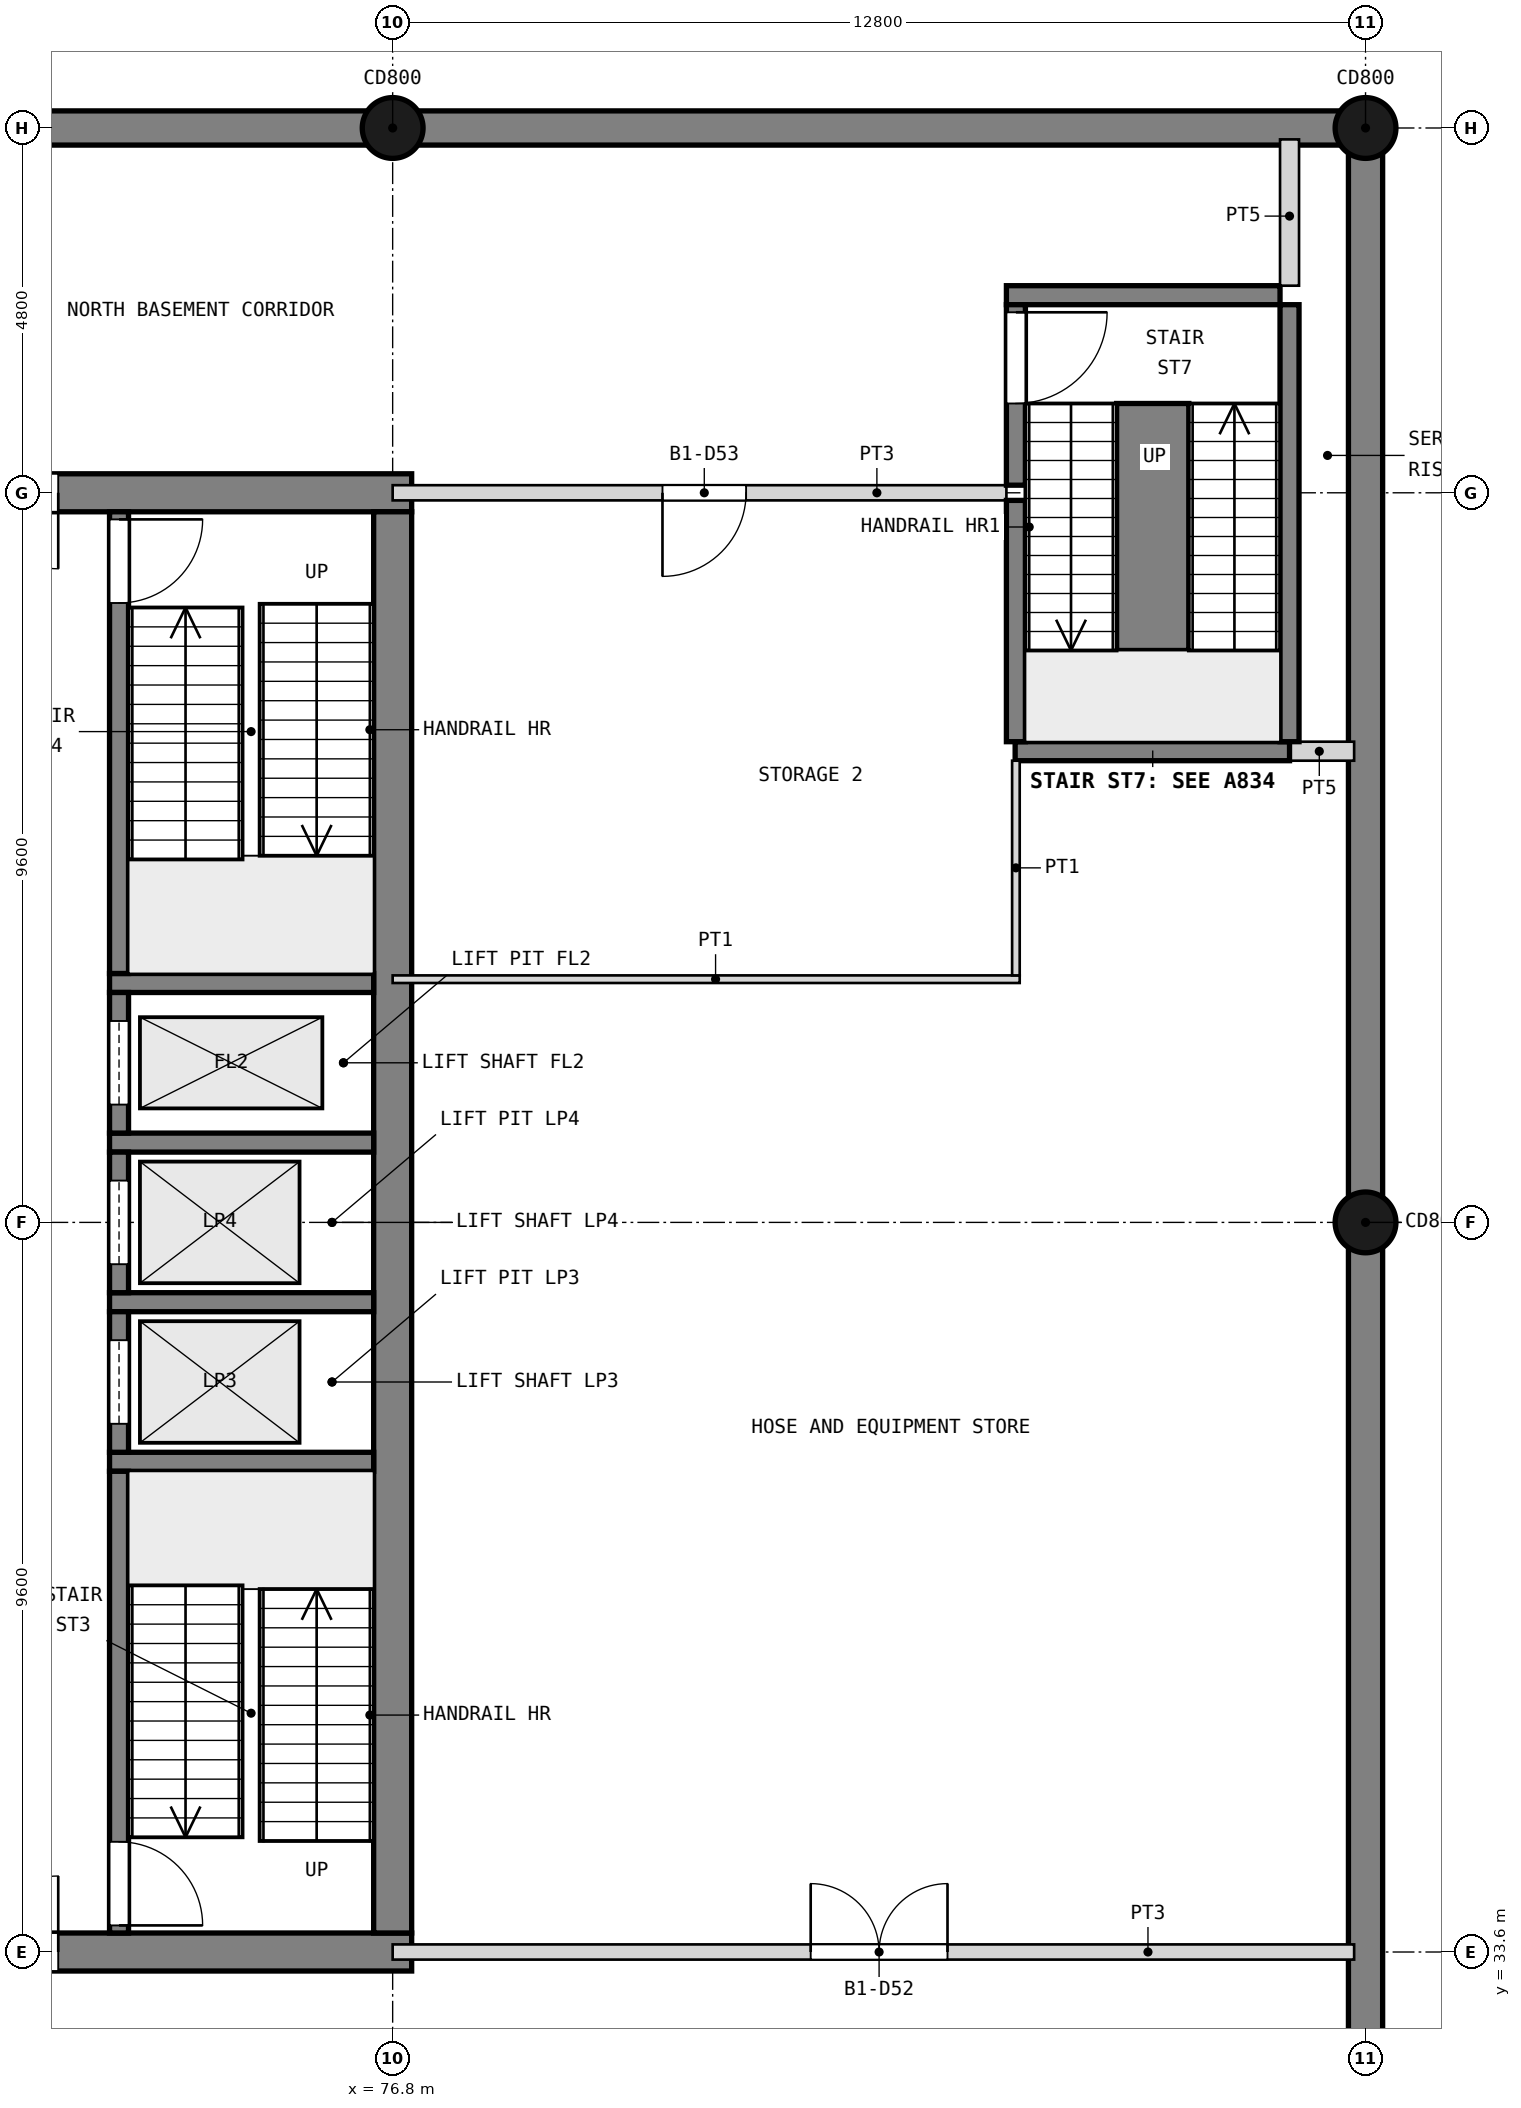
"""IFC4 building model, lengths in metres.
Left out: names, types, materials, properties, quantities, classifications, styles, units other than length and angle.
Written with IfcOpenShell. Run it as: python <this file> out.ifc"""

import sys

from ifc_helpers import new_model, si_unit, direction, frame, frame_2d, origin, origin_2d, place, context, subcontext, project, spatial, rectangle, circle, extrude, element, fill, save


model = new_model("IFC4")
c1 = context("Model", 3, precision=1e-05, world=origin(), true_north=direction((0.0, 1.0)))
c2 = subcontext(c1, "Body", "Model", "MODEL_VIEW")
j1 = project(units=[si_unit("LENGTHUNIT", "METRE"), si_unit("PLANEANGLEUNIT", "RADIAN")], contexts=[c1])
p1 = place(None, origin())
s1 = spatial("IfcSite", under=j1, at=p1, CompositionType="ELEMENT")
p2 = place(p1, origin())
s2 = spatial("IfcBuilding", under=s1, at=p2, CompositionType="ELEMENT")
p3 = place(p2, frame((0.0, 0.0, -4.8)))
s3 = spatial("IfcBuildingStorey", under=s2, at=p3, CompositionType="ELEMENT", Elevation=-4.8)
p4 = place(p3, frame((63.75, 52.8, 0.0), z_axis=(0.0, 0.0, 1.0), x_axis=(1.0, 0.0, 0.0)))
e1 = element("IfcWall", 1, at=p4, inside=s3, PredefinedType="SHEAR", context=c2, shape_type="SweptSolid", body=[
    extrude(rectangle(XDim=13.3, YDim=0.5, at=frame_2d((6.65, 0.0))), origin(), (0.0, 0.0, 1.0), 4.8),
])
p5 = place(p4, frame((6.65, 0.0, 0.0)))
e2 = element("IfcOpeningElement", 2, at=p5, cuts=e1, PredefinedType="OPENING", context=c2, shape_type="SweptSolid", body=[
    extrude(rectangle(XDim=2.0, YDim=2.1, at=frame_2d((1.0, 1.05))), frame((0.0, 0.26, 0.0), z_axis=(0.0, -1.0, 0.0), x_axis=(1.0, 0.0, 0.0)), (0.0, 0.0, 1.0), 0.52),
])
p6 = place(p3, frame((63.75, 33.6, 0.0), z_axis=(0.0, 0.0, 1.0), x_axis=(1.0, 0.0, 0.0)))
e3 = element("IfcWall", 3, at=p6, inside=s3, PredefinedType="SHEAR", context=c2, shape_type="SweptSolid", body=[
    extrude(rectangle(XDim=13.3, YDim=0.5, at=frame_2d((6.65, 0.0))), origin(), (0.0, 0.0, 1.0), 4.8),
])
p7 = place(p6, frame((6.65, 0.0, 0.0)))
e4 = element("IfcOpeningElement", 4, at=p7, cuts=e3, PredefinedType="OPENING", context=c2, shape_type="SweptSolid", body=[
    extrude(rectangle(XDim=2.0, YDim=2.1, at=frame_2d((1.0, 1.05))), frame((0.0, 0.26, 0.0), z_axis=(0.0, -1.0, 0.0), x_axis=(1.0, 0.0, 0.0)), (0.0, 0.0, 1.0), 0.52),
])
p8 = place(p3, frame((76.8, 33.85, 0.0), z_axis=(0.0, 0.0, 1.0), x_axis=(0.0, 1.0, 0.0)))
e5 = element("IfcWall", 5, at=p8, inside=s3, PredefinedType="SHEAR", context=c2, shape_type="SweptSolid", body=[
    extrude(rectangle(XDim=18.7, YDim=0.5, at=frame_2d((9.35, 0.0))), origin(), (0.0, 0.0, 1.0), 4.8),
])
p9 = place(p3, frame((89.6, -0.225, 0.0), z_axis=(0.0, 0.0, 1.0), x_axis=(0.0, 1.0, 0.0)))
e6 = element("IfcWall", 6, at=p9, inside=s3, PredefinedType="SOLIDWALL", context=c2, shape_type="SweptSolid", body=[
    extrude(rectangle(XDim=58.05, YDim=0.45, at=frame_2d((29.025, 0.0))), origin(), (0.0, 0.0, 1.0), 4.8),
])
p10 = place(p3, frame((89.375, 57.6, 0.0), z_axis=(0.0, 0.0, 1.0), x_axis=(-1.0, 0.0, 0.0)))
e7 = element("IfcWall", 7, at=p10, inside=s3, PredefinedType="SOLIDWALL", context=c2, shape_type="SweptSolid", body=[
    extrude(rectangle(XDim=25.15, YDim=0.45, at=frame_2d((12.575, 0.0))), origin(), (0.0, 0.0, 1.0), 4.8),
])
for number, where, z_axis, x_axis in (
    (8, (89.6, 43.2, 0.0), (0.0, 0.0, 1.0), (1.0, 0.0, 0.0)),
    (9, (89.6, 57.6, 0.0), (0.0, 0.0, 1.0), (1.0, 0.0, 0.0)),
    (10, (76.8, 57.6, 0.0), (0.0, 0.0, 1.0), (1.0, 0.0, 0.0)),
):
    element("IfcColumn", number, at=place(p3, frame(where, z_axis=z_axis, x_axis=x_axis)), inside=s3, PredefinedType="COLUMN", context=c2, shape_type="SweptSolid", body=[
        extrude(circle(Radius=0.4, at=origin_2d()), origin(), (0.0, 0.0, 1.0), 4.8),
    ])
for number, where, z_axis, x_axis in (
    (11, (76.55, 40.05, 0.0), (0.0, 0.0, 1.0), (-1.0, 0.0, 0.0)),
    (12, (76.55, 42.15, 0.0), (0.0, 0.0, 1.0), (-1.0, 0.0, 0.0)),
    (13, (76.55, 44.25, 0.0), (0.0, 0.0, 1.0), (-1.0, 0.0, 0.0)),
    (14, (76.55, 46.35, 0.0), (0.0, 0.0, 1.0), (-1.0, 0.0, 0.0)),
):
    element("IfcWall", number, at=place(p3, frame(where, z_axis=z_axis, x_axis=x_axis)), inside=s3, PredefinedType="SOLIDWALL", context=c2, shape_type="SweptSolid", body=[
        extrude(rectangle(XDim=3.475, YDim=0.25, at=frame_2d((1.738, 0.0))), origin(), (0.0, 0.0, 1.0), 4.5),
    ])
p11 = place(p3, frame((73.2, 33.85, 0.0), z_axis=(0.0, 0.0, 1.0), x_axis=(0.0, 1.0, 0.0)))
e15 = element("IfcWall", 15, at=p11, inside=s3, PredefinedType="SOLIDWALL", context=c2, shape_type="SweptSolid", body=[
    extrude(rectangle(XDim=6.075, YDim=0.25, at=frame_2d((3.038, 0.0))), origin(), (0.0, 0.0, 1.0), 4.5),
])
p12 = place(p11, frame((0.1, 0.0, 0.0)))
e16 = element("IfcOpeningElement", 16, at=p12, cuts=e15, PredefinedType="OPENING", context=c2, shape_type="SweptSolid", body=[
    extrude(rectangle(XDim=1.1, YDim=2.1, at=frame_2d((0.55, 1.05))), frame((0.0, 0.135, 0.0), z_axis=(0.0, -1.0, 0.0), x_axis=(1.0, 0.0, 0.0)), (0.0, 0.0, 1.0), 0.27),
])
p13 = place(p3, frame((73.2, 40.175, 0.0), z_axis=(0.0, 0.0, 1.0), x_axis=(0.0, 1.0, 0.0)))
e17 = element("IfcWall", 17, at=p13, inside=s3, PredefinedType="SOLIDWALL", context=c2, shape_type="SweptSolid", body=[
    extrude(rectangle(XDim=1.85, YDim=0.25, at=frame_2d((0.925, 0.0))), origin(), (0.0, 0.0, 1.0), 4.5),
])
p14 = place(p13, frame((0.375, 0.0, 0.0)))
e18 = element("IfcOpeningElement", 18, at=p14, cuts=e17, PredefinedType="OPENING", context=c2, shape_type="SweptSolid", body=[
    extrude(rectangle(XDim=1.1, YDim=2.1, at=frame_2d((0.55, 1.05))), frame((0.0, 0.135, 0.0), z_axis=(0.0, -1.0, 0.0), x_axis=(1.0, 0.0, 0.0)), (0.0, 0.0, 1.0), 0.27),
])
p15 = place(p3, frame((73.2, 42.275, 0.0), z_axis=(0.0, 0.0, 1.0), x_axis=(0.0, 1.0, 0.0)))
e19 = element("IfcWall", 19, at=p15, inside=s3, PredefinedType="SOLIDWALL", context=c2, shape_type="SweptSolid", body=[
    extrude(rectangle(XDim=1.85, YDim=0.25, at=frame_2d((0.925, 0.0))), origin(), (0.0, 0.0, 1.0), 4.5),
])
p16 = place(p15, frame((0.375, 0.0, 0.0)))
e20 = element("IfcOpeningElement", 20, at=p16, cuts=e19, PredefinedType="OPENING", context=c2, shape_type="SweptSolid", body=[
    extrude(rectangle(XDim=1.1, YDim=2.1, at=frame_2d((0.55, 1.05))), frame((0.0, 0.135, 0.0), z_axis=(0.0, -1.0, 0.0), x_axis=(1.0, 0.0, 0.0)), (0.0, 0.0, 1.0), 0.27),
])
p17 = place(p3, frame((73.2, 44.375, 0.0), z_axis=(0.0, 0.0, 1.0), x_axis=(0.0, 1.0, 0.0)))
e21 = element("IfcWall", 21, at=p17, inside=s3, PredefinedType="SOLIDWALL", context=c2, shape_type="SweptSolid", body=[
    extrude(rectangle(XDim=1.85, YDim=0.25, at=frame_2d((0.925, 0.0))), origin(), (0.0, 0.0, 1.0), 4.5),
])
p18 = place(p17, frame((0.375, 0.0, 0.0)))
e22 = element("IfcOpeningElement", 22, at=p18, cuts=e21, PredefinedType="OPENING", context=c2, shape_type="SweptSolid", body=[
    extrude(rectangle(XDim=1.1, YDim=2.1, at=frame_2d((0.55, 1.05))), frame((0.0, 0.135, 0.0), z_axis=(0.0, -1.0, 0.0), x_axis=(1.0, 0.0, 0.0)), (0.0, 0.0, 1.0), 0.27),
])
p19 = place(p3, frame((73.2, 46.475, 0.0), z_axis=(0.0, 0.0, 1.0), x_axis=(0.0, 1.0, 0.0)))
e23 = element("IfcWall", 23, at=p19, inside=s3, PredefinedType="SOLIDWALL", context=c2, shape_type="SweptSolid", body=[
    extrude(rectangle(XDim=6.075, YDim=0.25, at=frame_2d((3.038, 0.0))), origin(), (0.0, 0.0, 1.0), 4.5),
])
p20 = place(p19, frame((4.875, 0.0, 0.0)))
e24 = element("IfcOpeningElement", 24, at=p20, cuts=e23, PredefinedType="OPENING", context=c2, shape_type="SweptSolid", body=[
    extrude(rectangle(XDim=1.1, YDim=2.1, at=frame_2d((0.55, 1.05))), frame((0.0, 0.135, 0.0), z_axis=(0.0, -1.0, 0.0), x_axis=(1.0, 0.0, 0.0)), (0.0, 0.0, 1.0), 0.27),
])
p21 = place(p3, frame((89.45, 33.6, 0.0), z_axis=(0.0, 0.0, 1.0), x_axis=(-1.0, 0.0, 0.0)))
e25 = element("IfcWall", 25, at=p21, inside=s3, PredefinedType="PARTITIONING", context=c2, shape_type="SweptSolid", body=[
    extrude(rectangle(XDim=12.65, YDim=0.2, at=frame_2d((6.325, 0.0))), origin(), (0.0, 0.0, 1.0), 4.5),
])
p22 = place(p21, frame((5.35, 0.0, 0.0)))
e26 = element("IfcOpeningElement", 26, at=p22, cuts=e25, PredefinedType="OPENING", context=c2, shape_type="SweptSolid", body=[
    extrude(rectangle(XDim=1.8, YDim=2.1, at=frame_2d((0.9, 1.05))), frame((0.0, 0.11, 0.0), z_axis=(0.0, -1.0, 0.0), x_axis=(1.0, 0.0, 0.0)), (0.0, 0.0, 1.0), 0.22),
])
p23 = place(p3, frame((85.05, 46.4, 0.0), z_axis=(0.0, 0.0, 1.0), x_axis=(-1.0, 0.0, 0.0)))
e27 = element("IfcWall", 27, at=p23, inside=s3, PredefinedType="PARTITIONING", context=c2, shape_type="SweptSolid", body=[
    extrude(rectangle(XDim=8.25, YDim=0.1, at=frame_2d((4.125, 0.0))), origin(), (0.0, 0.0, 1.0), 4.5),
])
p24 = place(p3, frame((89.45, 49.4, 0.0), z_axis=(0.0, 0.0, 1.0), x_axis=(-1.0, 0.0, 0.0)))
e28 = element("IfcWall", 28, at=p24, inside=s3, PredefinedType="PARTITIONING", context=c2, shape_type="SweptSolid", body=[
    extrude(rectangle(XDim=0.85, YDim=0.25, at=frame_2d((0.425, 0.0))), origin(), (0.0, 0.0, 1.0), 4.5),
])
p25 = place(p3, frame((88.6, 49.4, 0.0), z_axis=(0.0, 0.0, 1.0), x_axis=(-1.0, 0.0, 0.0)))
e29 = element("IfcWall", 29, at=p25, inside=s3, PredefinedType="SHEAR", context=c2, shape_type="SweptSolid", body=[
    extrude(rectangle(XDim=3.61, YDim=0.25, at=frame_2d((1.805, 0.0))), origin(), (0.0, 0.0, 1.0), 4.5),
])
p26 = place(p3, frame((84.875, 52.8, 0.0), z_axis=(0.0, 0.0, 1.0), x_axis=(-1.0, 0.0, 0.0)))
e30 = element("IfcWall", 30, at=p26, inside=s3, PredefinedType="PARTITIONING", context=c2, shape_type="SweptSolid", body=[
    extrude(rectangle(XDim=8.075, YDim=0.2, at=frame_2d((4.038, 0.0))), origin(), (0.0, 0.0, 1.0), 4.5),
])
p27 = place(p26, frame((3.425, 0.0, 0.0)))
e31 = element("IfcOpeningElement", 31, at=p27, cuts=e30, PredefinedType="OPENING", context=c2, shape_type="SweptSolid", body=[
    extrude(rectangle(XDim=1.1, YDim=2.1, at=frame_2d((0.55, 1.05))), frame((0.0, 0.11, 0.0), z_axis=(0.0, -1.0, 0.0), x_axis=(1.0, 0.0, 0.0)), (0.0, 0.0, 1.0), 0.22),
])
p28 = place(p3, frame((88.475, 55.4, 0.0), z_axis=(0.0, 0.0, 1.0), x_axis=(-1.0, 0.0, 0.0)))
e32 = element("IfcWall", 32, at=p28, inside=s3, PredefinedType="SHEAR", context=c2, shape_type="SweptSolid", body=[
    extrude(rectangle(XDim=3.6, YDim=0.25, at=frame_2d((1.8, 0.0))), origin(), (0.0, 0.0, 1.0), 4.5),
])
p29 = place(p3, frame((88.6, 49.525, 0.0), z_axis=(0.0, 0.0, 1.0), x_axis=(0.0, 1.0, 0.0)))
e33 = element("IfcWall", 33, at=p29, inside=s3, PredefinedType="SHEAR", context=c2, shape_type="SweptSolid", body=[
    extrude(rectangle(XDim=5.75, YDim=0.25, at=frame_2d((2.875, 0.0))), origin(), (0.0, 0.0, 1.0), 4.5),
])
p30 = place(p3, frame((88.6, 55.525, 0.0), z_axis=(0.0, 0.0, 1.0), x_axis=(0.0, 1.0, 0.0)))
e34 = element("IfcWall", 34, at=p30, inside=s3, PredefinedType="PARTITIONING", context=c2, shape_type="SweptSolid", body=[
    extrude(rectangle(XDim=1.925, YDim=0.25, at=frame_2d((0.962, 0.0))), origin(), (0.0, 0.0, 1.0), 4.5),
])
p31 = place(p3, frame((85.0, 46.45, 0.0), z_axis=(0.0, 0.0, 1.0), x_axis=(0.0, 1.0, 0.0)))
e35 = element("IfcWall", 35, at=p31, inside=s3, PredefinedType="PARTITIONING", context=c2, shape_type="SweptSolid", body=[
    extrude(rectangle(XDim=2.825, YDim=0.1, at=frame_2d((1.413, 0.0))), origin(), (0.0, 0.0, 1.0), 4.5),
])
p32 = place(p3, frame((85.0, 49.525, 0.0), z_axis=(0.0, 0.0, 1.0), x_axis=(0.0, 1.0, 0.0)))
e36 = element("IfcWall", 36, at=p32, inside=s3, PredefinedType="SHEAR", context=c2, shape_type="SweptSolid", body=[
    extrude(rectangle(XDim=3.175, YDim=0.25, at=frame_2d((1.587, 0.0))), origin(), (0.0, 0.0, 1.0), 4.5),
])
p33 = place(p3, frame((85.0, 52.9, 0.0), z_axis=(0.0, 0.0, 1.0), x_axis=(0.0, 1.0, 0.0)))
e37 = element("IfcWall", 37, at=p33, inside=s3, PredefinedType="SHEAR", context=c2, shape_type="SweptSolid", body=[
    extrude(rectangle(XDim=2.375, YDim=0.25, at=frame_2d((1.188, 0.0))), origin(), (0.0, 0.0, 1.0), 4.5),
])
p34 = place(p33, frame((1.075, 0.0, 0.0)))
e38 = element("IfcOpeningElement", 38, at=p34, cuts=e37, PredefinedType="OPENING", context=c2, shape_type="SweptSolid", body=[
    extrude(rectangle(XDim=1.2, YDim=2.1, at=frame_2d((0.6, 1.05))), frame((0.0, 0.135, 0.0), z_axis=(0.0, -1.0, 0.0), x_axis=(1.0, 0.0, 0.0)), (0.0, 0.0, 1.0), 0.27),
])
p35 = place(p3, frame((86.8, 53.975, 0.0), z_axis=(0.0, 0.0, 1.0), x_axis=(0.0, -1.0, 0.0)))
e39 = element("IfcWall", 39, at=p35, inside=s3, PredefinedType="SHEAR", context=c2, shape_type="SweptSolid", body=[
    extrude(rectangle(XDim=3.25, YDim=0.95, at=frame_2d((1.625, 0.0))), origin(), (0.0, 0.0, 1.0), 4.8),
])
p36 = place(p12, frame((1.1, 0.0, 0.0), z_axis=(0.0, 0.0, 1.0), x_axis=(-1.0, 0.0, 0.0)))
e40 = element("IfcDoor", 40, at=p36, inside=s3, OperationType="SINGLE_SWING_RIGHT", PredefinedType="DOOR", context=c2, shape_type="SweptSolid", body=[
    extrude(rectangle(XDim=1.1, YDim=2.1, at=frame_2d((0.55, 1.05))), frame((0.0, 0.025, 0.0), z_axis=(0.0, -1.0, 0.0), x_axis=(1.0, 0.0, 0.0)), (0.0, 0.0, 1.0), 0.05),
])
fill(e16, e40)
p37 = place(p20, frame((1.1, 0.0, 0.0), z_axis=(0.0, 0.0, 1.0), x_axis=(-1.0, 0.0, 0.0)))
e41 = element("IfcDoor", 41, at=p37, inside=s3, OperationType="SINGLE_SWING_LEFT", PredefinedType="DOOR", context=c2, shape_type="SweptSolid", body=[
    extrude(rectangle(XDim=1.1, YDim=2.1, at=frame_2d((0.55, 1.05))), frame((0.0, 0.025, 0.0), z_axis=(0.0, -1.0, 0.0), x_axis=(1.0, 0.0, 0.0)), (0.0, 0.0, 1.0), 0.05),
])
fill(e24, e41)
p38 = place(p14, origin())
e42 = element("IfcDoor", 42, at=p38, inside=s3, OperationType="SLIDING_TO_LEFT", PredefinedType="DOOR", context=c2, shape_type="SweptSolid", body=[
    extrude(rectangle(XDim=1.1, YDim=2.1, at=frame_2d((0.55, 1.05))), frame((0.0, 0.025, 0.0), z_axis=(0.0, -1.0, 0.0), x_axis=(1.0, 0.0, 0.0)), (0.0, 0.0, 1.0), 0.05),
])
fill(e18, e42)
p39 = place(p16, origin())
e43 = element("IfcDoor", 43, at=p39, inside=s3, OperationType="SLIDING_TO_LEFT", PredefinedType="DOOR", context=c2, shape_type="SweptSolid", body=[
    extrude(rectangle(XDim=1.1, YDim=2.1, at=frame_2d((0.55, 1.05))), frame((0.0, 0.025, 0.0), z_axis=(0.0, -1.0, 0.0), x_axis=(1.0, 0.0, 0.0)), (0.0, 0.0, 1.0), 0.05),
])
fill(e20, e43)
p40 = place(p18, origin())
e44 = element("IfcDoor", 44, at=p40, inside=s3, OperationType="SLIDING_TO_LEFT", PredefinedType="DOOR", context=c2, shape_type="SweptSolid", body=[
    extrude(rectangle(XDim=1.1, YDim=2.1, at=frame_2d((0.55, 1.05))), frame((0.0, 0.025, 0.0), z_axis=(0.0, -1.0, 0.0), x_axis=(1.0, 0.0, 0.0)), (0.0, 0.0, 1.0), 0.05),
])
fill(e22, e44)
p41 = place(p7, origin())
e45 = element("IfcDoor", 45, at=p41, inside=s3, OperationType="DOUBLE_DOOR_SINGLE_SWING", PredefinedType="DOOR", context=c2, shape_type="SweptSolid", body=[
    extrude(rectangle(XDim=2.0, YDim=2.1, at=frame_2d((1.0, 1.05))), frame((0.0, 0.025, 0.0), z_axis=(0.0, -1.0, 0.0), x_axis=(1.0, 0.0, 0.0)), (0.0, 0.0, 1.0), 0.05),
])
fill(e4, e45)
p42 = place(p5, frame((2.0, 0.0, 0.0), z_axis=(0.0, 0.0, 1.0), x_axis=(-1.0, 0.0, 0.0)))
e46 = element("IfcDoor", 46, at=p42, inside=s3, OperationType="DOUBLE_DOOR_SINGLE_SWING", PredefinedType="DOOR", context=c2, shape_type="SweptSolid", body=[
    extrude(rectangle(XDim=2.0, YDim=2.1, at=frame_2d((1.0, 1.05))), frame((0.0, 0.025, 0.0), z_axis=(0.0, -1.0, 0.0), x_axis=(1.0, 0.0, 0.0)), (0.0, 0.0, 1.0), 0.05),
])
fill(e2, e46)
p43 = place(p22, frame((1.8, 0.0, 0.0), z_axis=(0.0, 0.0, 1.0), x_axis=(-1.0, 0.0, 0.0)))
e47 = element("IfcDoor", 47, at=p43, inside=s3, OperationType="DOUBLE_DOOR_SINGLE_SWING", PredefinedType="DOOR", context=c2, shape_type="SweptSolid", body=[
    extrude(rectangle(XDim=1.8, YDim=2.1, at=frame_2d((0.9, 1.05))), frame((0.0, 0.025, 0.0), z_axis=(0.0, -1.0, 0.0), x_axis=(1.0, 0.0, 0.0)), (0.0, 0.0, 1.0), 0.05),
])
fill(e26, e47)
p44 = place(p27, origin())
e48 = element("IfcDoor", 48, at=p44, inside=s3, OperationType="SINGLE_SWING_RIGHT", PredefinedType="DOOR", context=c2, shape_type="SweptSolid", body=[
    extrude(rectangle(XDim=1.1, YDim=2.1, at=frame_2d((0.55, 1.05))), frame((0.0, 0.025, 0.0), z_axis=(0.0, -1.0, 0.0), x_axis=(1.0, 0.0, 0.0)), (0.0, 0.0, 1.0), 0.05),
])
fill(e31, e48)
p45 = place(p34, frame((1.2, 0.0, 0.0), z_axis=(0.0, 0.0, 1.0), x_axis=(-1.0, 0.0, 0.0)))
e49 = element("IfcDoor", 49, at=p45, inside=s3, OperationType="SINGLE_SWING_LEFT", PredefinedType="DOOR", context=c2, shape_type="SweptSolid", body=[
    extrude(rectangle(XDim=1.2, YDim=2.1, at=frame_2d((0.6, 1.05))), frame((0.0, 0.025, 0.0), z_axis=(0.0, -1.0, 0.0), x_axis=(1.0, 0.0, 0.0)), (0.0, 0.0, 1.0), 0.05),
])
fill(e38, e49)
save(model, sys.argv[1])
